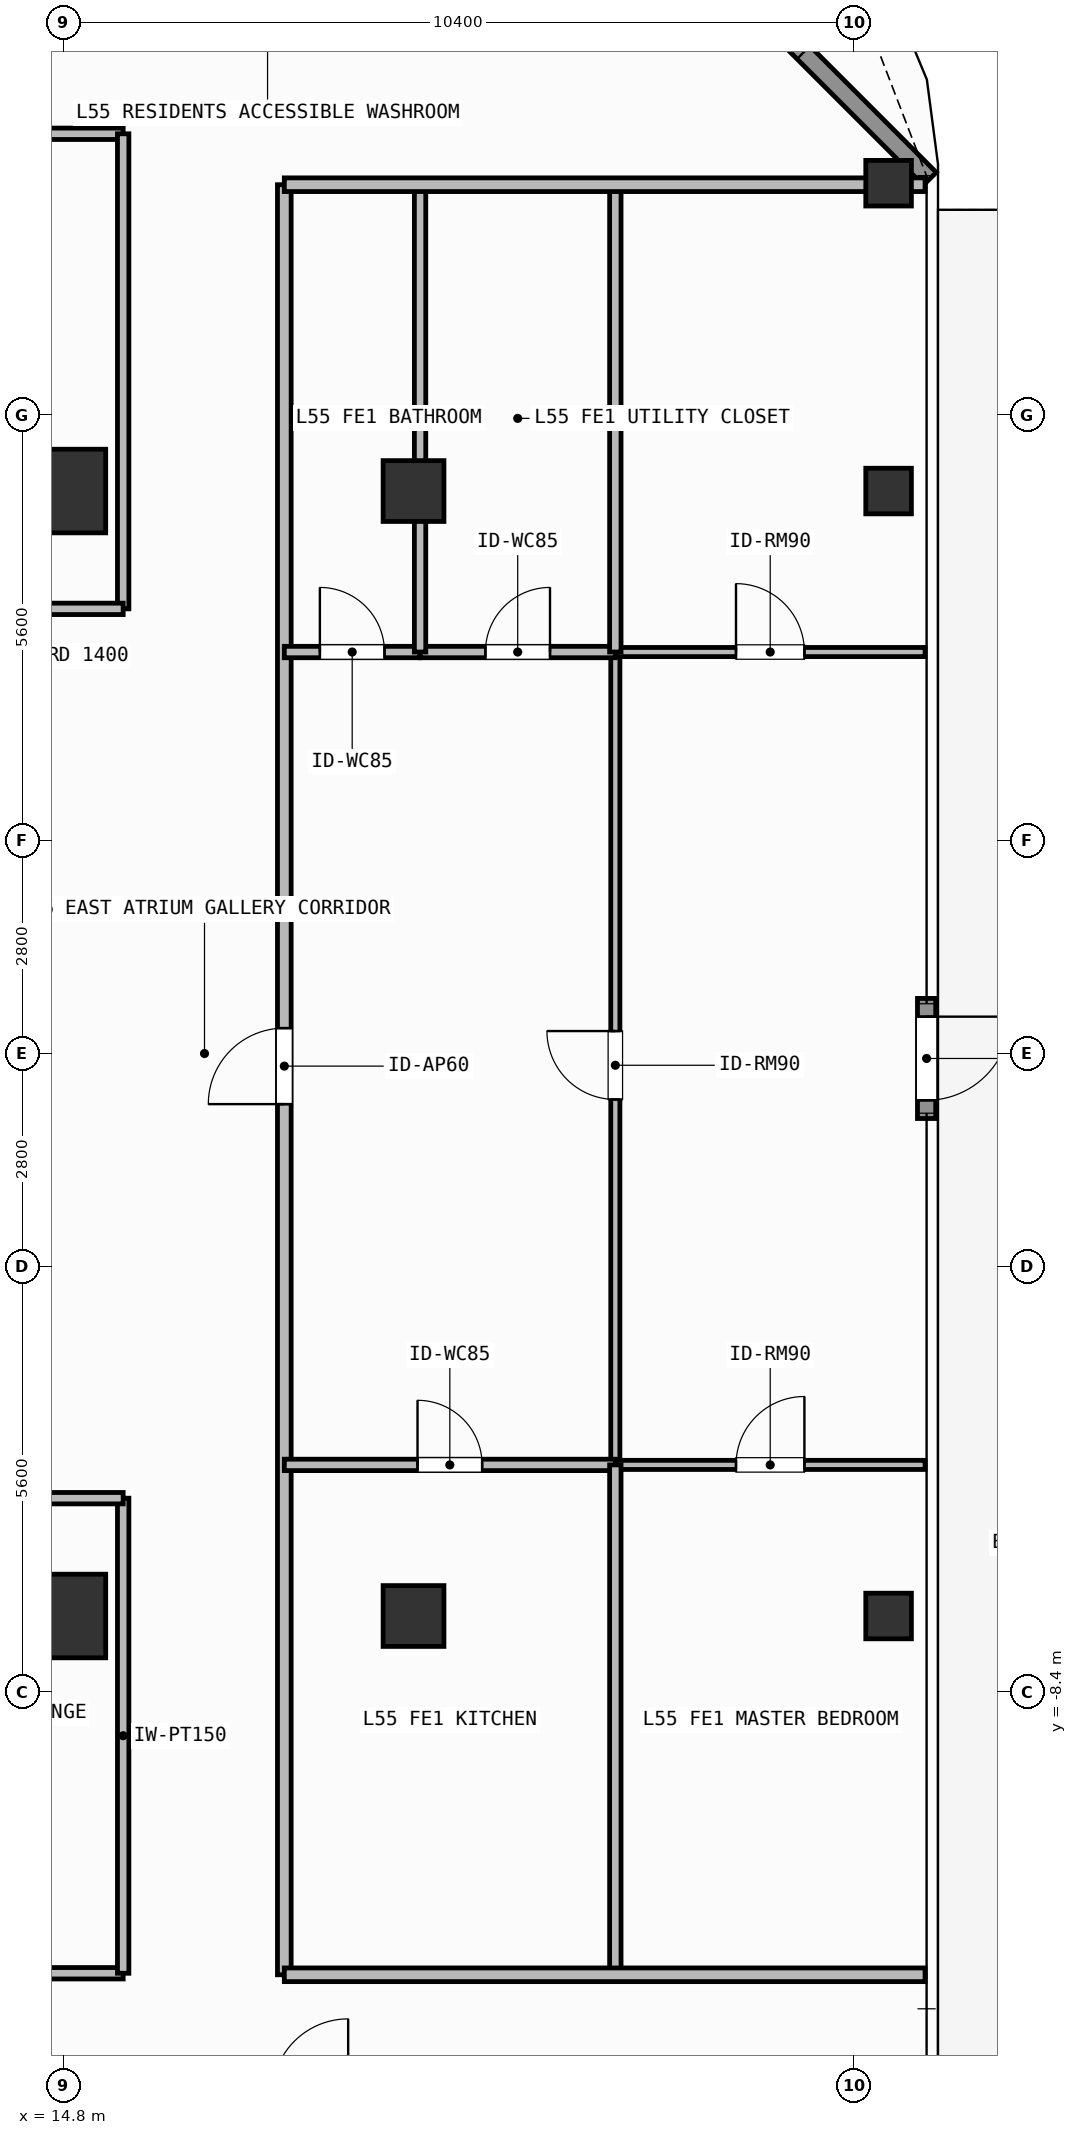
"""IFC4 building model, lengths in metres.
Left out: names, types, materials, properties, quantities, classifications, styles, units other than length and angle.
Written with IfcOpenShell. Run it as: python <this file> out.ifc"""

import sys

from ifc_helpers import new_model, si_unit, direction, frame, frame_2d, origin, origin_2d, place, context, subcontext, project, spatial, rectangle, hollow_rectangle, extrude, element, fill, save


model = new_model("IFC4")
c1 = context("Model", 3, precision=1e-05, world=origin(), true_north=direction((0.0, 1.0)))
c2 = subcontext(c1, "Body", "Model", "MODEL_VIEW")
j1 = project(units=[si_unit("LENGTHUNIT", "METRE"), si_unit("PLANEANGLEUNIT", "RADIAN")], contexts=[c1])
p1 = place(None, origin())
s1 = spatial("IfcSite", under=j1, at=p1, CompositionType="ELEMENT")
p2 = place(p1, origin())
s2 = spatial("IfcBuilding", under=s1, at=p2, CompositionType="ELEMENT")
p3 = place(p2, frame((0.0, 0.0, 223.5)))
s3 = spatial("IfcBuildingStorey", under=s2, at=p3, CompositionType="ELEMENT", Elevation=223.5)
for number, where, z_axis, x_axis in (
    (1, (14.8, -7.4, 0.0), (0.0, 0.0, 1.0), (1.0, 0.0, 0.0)),
    (2, (14.8, 7.4, 0.0), (0.0, 0.0, 1.0), (1.0, 0.0, 0.0)),
):
    element("IfcColumn", number, at=place(p3, frame(where, z_axis=z_axis, x_axis=x_axis)), inside=s3, PredefinedType="COLUMN", context=c2, shape_type="SweptSolid", body=[
        extrude(rectangle(XDim=1.1, YDim=1.1, at=origin_2d()), origin(), (0.0, 0.0, 1.0), 3.9),
    ])
for number, where, z_axis, x_axis in (
    (3, (19.4, -7.4, 0.0), (0.0, 0.0, 1.0), (1.0, 0.0, 0.0)),
    (4, (19.4, 7.4, 0.0), (0.0, 0.0, 1.0), (1.0, 0.0, 0.0)),
):
    element("IfcColumn", number, at=place(p3, frame(where, z_axis=z_axis, x_axis=x_axis)), inside=s3, PredefinedType="COLUMN", context=c2, shape_type="SweptSolid", body=[
        extrude(hollow_rectangle(XDim=0.8, YDim=0.8, WallThickness=0.036, at=origin_2d()), origin(), (0.0, 0.0, 1.0), 3.9),
    ])
for number, where, z_axis, x_axis in (
    (5, (25.65, 11.45, 0.0), (0.0, 0.0, 1.0), (1.0, 0.0, 0.0)),
    (6, (25.65, -7.4, 0.0), (0.0, 0.0, 1.0), (1.0, 0.0, 0.0)),
    (7, (25.65, 7.4, 0.0), (0.0, 0.0, 1.0), (1.0, 0.0, 0.0)),
):
    element("IfcColumn", number, at=place(p3, frame(where, z_axis=z_axis, x_axis=x_axis)), inside=s3, PredefinedType="COLUMN", context=c2, shape_type="SweptSolid", body=[
        extrude(hollow_rectangle(XDim=0.6, YDim=0.6, WallThickness=0.028, at=origin_2d()), origin(), (0.0, 0.0, 1.0), 3.9),
    ])
p4 = place(p3, frame((26.15, 0.725, 0.0), z_axis=(0.0, 0.0, 1.0), x_axis=(0.0, -1.0, 0.0)))
e8 = element("IfcWall", 8, at=p4, inside=s3, PredefinedType="SOLIDWALL", context=c2, shape_type="SweptSolid", body=[
    extrude(rectangle(XDim=1.58, YDim=0.24, at=frame_2d((0.79, 0.0))), origin(), (0.0, 0.0, 1.0), 3.68),
])
p5 = place(p4, frame((0.24, 0.0, 0.0)))
e9 = element("IfcOpeningElement", 9, at=p5, cuts=e8, PredefinedType="OPENING", context=c2, shape_type="SweptSolid", body=[
    extrude(rectangle(XDim=1.1, YDim=2.2, at=frame_2d((0.55, 1.1))), frame((0.0, 0.13, 0.0), z_axis=(0.0, -1.0, 0.0), x_axis=(1.0, 0.0, 0.0)), (0.0, 0.0, 1.0), 0.26),
])
p6 = place(p3, frame((21.808, 15.892, 0.0), z_axis=(0.0, 0.0, 1.0), x_axis=(0.707106781187, -0.707106781187, 0.0)))
e10 = element("IfcWall", 10, at=p6, inside=s3, PredefinedType="SOLIDWALL", context=c2, shape_type="SweptSolid", body=[
    extrude(rectangle(XDim=6.201, YDim=0.24, at=frame_2d((3.101, 0.0))), origin(), (0.0, 0.0, 1.0), 3.68),
])
p7 = place(p6, frame((2.351, 0.0, 0.8)))
e11 = element("IfcOpeningElement", 11, at=p7, cuts=e10, PredefinedType="OPENING", context=c2, shape_type="SweptSolid", body=[
    extrude(rectangle(XDim=1.5, YDim=1.85, at=frame_2d((0.75, 0.925))), frame((0.0, 0.13, 0.0), z_axis=(0.0, -1.0, 0.0), x_axis=(1.0, 0.0, 0.0)), (0.0, 0.0, 1.0), 0.26),
])
p8 = place(p3, frame((10.1, -12.1, 0.0), z_axis=(0.0, 0.0, 1.0), x_axis=(1.0, 0.0, 0.0)))
e12 = element("IfcWall", 12, at=p8, inside=s3, PredefinedType="PARTITIONING", context=c2, shape_type="SweptSolid", body=[
    extrude(rectangle(XDim=5.48, YDim=0.15, at=frame_2d((2.74, 0.0))), origin(), (0.0, 0.0, 1.0), 3.68),
])
p9 = place(p8, frame((2.29, 0.0, 0.0)))
e13 = element("IfcOpeningElement", 13, at=p9, cuts=e12, PredefinedType="OPENING", context=c2, shape_type="SweptSolid", body=[
    extrude(rectangle(XDim=0.9, YDim=2.1, at=frame_2d((0.45, 1.05))), frame((0.0, 0.085, 0.0), z_axis=(0.0, -1.0, 0.0), x_axis=(1.0, 0.0, 0.0)), (0.0, 0.0, 1.0), 0.17),
])
p10 = place(p3, frame((8.36, 12.1, 0.0), z_axis=(0.0, 0.0, 1.0), x_axis=(1.0, 0.0, 0.0)))
e14 = element("IfcWall", 14, at=p10, inside=s3, PredefinedType="PARTITIONING", context=c2, shape_type="SweptSolid", body=[
    extrude(rectangle(XDim=7.22, YDim=0.15, at=frame_2d((3.61, 0.0))), origin(), (0.0, 0.0, 1.0), 3.68),
])
p11 = place(p10, frame((3.513, 0.0, 0.0)))
e15 = element("IfcOpeningElement", 15, at=p11, cuts=e14, PredefinedType="OPENING", context=c2, shape_type="SweptSolid", body=[
    extrude(rectangle(XDim=0.9, YDim=2.1, at=frame_2d((0.45, 1.05))), frame((0.0, 0.085, 0.0), z_axis=(0.0, -1.0, 0.0), x_axis=(1.0, 0.0, 0.0)), (0.0, 0.0, 1.0), 0.17),
])
p12 = place(p3, frame((17.7, -12.12, 0.0), z_axis=(0.0, 0.0, 1.0), x_axis=(0.0, 1.0, 0.0)))
e16 = element("IfcWall", 16, at=p12, inside=s3, PredefinedType="PARTITIONING", context=c2, shape_type="SweptSolid", body=[
    extrude(rectangle(XDim=23.55, YDim=0.18, at=frame_2d((11.775, 0.0))), origin(), (0.0, 0.0, 1.0), 3.68),
])
p13 = place(p12, frame((11.454, 0.0, 0.0)))
e17 = element("IfcOpeningElement", 17, at=p13, cuts=e16, PredefinedType="OPENING", context=c2, shape_type="SweptSolid", body=[
    extrude(rectangle(XDim=1.0, YDim=2.2, at=frame_2d((0.5, 1.1))), frame((0.0, 0.1, 0.0), z_axis=(0.0, -1.0, 0.0), x_axis=(1.0, 0.0, 0.0)), (0.0, 0.0, 1.0), 0.2),
])
p14 = place(p3, frame((22.055, -5.412, 0.0), z_axis=(0.0, 0.0, 1.0), x_axis=(0.0, 1.0, 0.0)))
e18 = element("IfcWall", 18, at=p14, inside=s3, PredefinedType="PARTITIONING", context=c2, shape_type="SweptSolid", body=[
    extrude(rectangle(XDim=10.694, YDim=0.12, at=frame_2d((5.347, 0.0))), origin(), (0.0, 0.0, 1.0), 3.68),
])
p15 = place(p14, frame((4.808, 0.0, 0.0)))
e19 = element("IfcOpeningElement", 19, at=p15, cuts=e18, PredefinedType="OPENING", context=c2, shape_type="SweptSolid", body=[
    extrude(rectangle(XDim=0.9, YDim=2.1, at=frame_2d((0.45, 1.05))), frame((0.0, 0.07, 0.0), z_axis=(0.0, -1.0, 0.0), x_axis=(1.0, 0.0, 0.0)), (0.0, 0.0, 1.0), 0.14),
])
p16 = place(p3, frame((17.7, 5.282, 0.0), z_axis=(0.0, 0.0, 1.0), x_axis=(1.0, 0.0, 0.0)))
e20 = element("IfcWall", 20, at=p16, inside=s3, PredefinedType="PARTITIONING", context=c2, shape_type="SweptSolid", body=[
    extrude(rectangle(XDim=1.786, YDim=0.15, at=frame_2d((0.893, 0.0))), origin(), (0.0, 0.0, 1.0), 3.68),
])
p17 = place(p16, frame((0.468, 0.0, 0.0)))
e21 = element("IfcOpeningElement", 21, at=p17, cuts=e20, PredefinedType="OPENING", context=c2, shape_type="SweptSolid", body=[
    extrude(rectangle(XDim=0.85, YDim=2.1, at=frame_2d((0.425, 1.05))), frame((0.0, 0.085, 0.0), z_axis=(0.0, -1.0, 0.0), x_axis=(1.0, 0.0, 0.0)), (0.0, 0.0, 1.0), 0.17),
])
p18 = place(p3, frame((19.486, 5.282, 0.0), z_axis=(0.0, 0.0, 1.0), x_axis=(1.0, 0.0, 0.0)))
e22 = element("IfcWall", 22, at=p18, inside=s3, PredefinedType="PARTITIONING", context=c2, shape_type="SweptSolid", body=[
    extrude(rectangle(XDim=2.569, YDim=0.15, at=frame_2d((1.284, 0.0))), origin(), (0.0, 0.0, 1.0), 3.68),
])
p19 = place(p18, frame((0.86, 0.0, 0.0)))
e23 = element("IfcOpeningElement", 23, at=p19, cuts=e22, PredefinedType="OPENING", context=c2, shape_type="SweptSolid", body=[
    extrude(rectangle(XDim=0.85, YDim=2.1, at=frame_2d((0.425, 1.05))), frame((0.0, 0.085, 0.0), z_axis=(0.0, -1.0, 0.0), x_axis=(1.0, 0.0, 0.0)), (0.0, 0.0, 1.0), 0.17),
])
p20 = place(p3, frame((17.7, -5.412, 0.0), z_axis=(0.0, 0.0, 1.0), x_axis=(1.0, 0.0, 0.0)))
e24 = element("IfcWall", 24, at=p20, inside=s3, PredefinedType="PARTITIONING", context=c2, shape_type="SweptSolid", body=[
    extrude(rectangle(XDim=4.355, YDim=0.15, at=frame_2d((2.177, 0.0))), origin(), (0.0, 0.0, 1.0), 3.68),
])
p21 = place(p20, frame((1.752, 0.0, 0.0)))
e25 = element("IfcOpeningElement", 25, at=p21, cuts=e24, PredefinedType="OPENING", context=c2, shape_type="SweptSolid", body=[
    extrude(rectangle(XDim=0.85, YDim=2.1, at=frame_2d((0.425, 1.05))), frame((0.0, 0.085, 0.0), z_axis=(0.0, -1.0, 0.0), x_axis=(1.0, 0.0, 0.0)), (0.0, 0.0, 1.0), 0.17),
])
p22 = place(p3, frame((22.055, -5.412, 0.0), z_axis=(0.0, 0.0, 1.0), x_axis=(1.0, 0.0, 0.0)))
e26 = element("IfcWall", 26, at=p22, inside=s3, PredefinedType="PARTITIONING", context=c2, shape_type="SweptSolid", body=[
    extrude(rectangle(XDim=4.075, YDim=0.12, at=frame_2d((2.038, 0.0))), origin(), (0.0, 0.0, 1.0), 3.68),
])
p23 = place(p22, frame((1.587, 0.0, 0.0)))
e27 = element("IfcOpeningElement", 27, at=p23, cuts=e26, PredefinedType="OPENING", context=c2, shape_type="SweptSolid", body=[
    extrude(rectangle(XDim=0.9, YDim=2.1, at=frame_2d((0.45, 1.05))), frame((0.0, 0.07, 0.0), z_axis=(0.0, -1.0, 0.0), x_axis=(1.0, 0.0, 0.0)), (0.0, 0.0, 1.0), 0.14),
])
p24 = place(p3, frame((22.055, 5.282, 0.0), z_axis=(0.0, 0.0, 1.0), x_axis=(1.0, 0.0, 0.0)))
e28 = element("IfcWall", 28, at=p24, inside=s3, PredefinedType="PARTITIONING", context=c2, shape_type="SweptSolid", body=[
    extrude(rectangle(XDim=4.075, YDim=0.12, at=frame_2d((2.038, 0.0))), origin(), (0.0, 0.0, 1.0), 3.68),
])
p25 = place(p24, frame((1.587, 0.0, 0.0)))
e29 = element("IfcOpeningElement", 29, at=p25, cuts=e28, PredefinedType="OPENING", context=c2, shape_type="SweptSolid", body=[
    extrude(rectangle(XDim=0.9, YDim=2.1, at=frame_2d((0.45, 1.05))), frame((0.0, 0.07, 0.0), z_axis=(0.0, -1.0, 0.0), x_axis=(1.0, 0.0, 0.0)), (0.0, 0.0, 1.0), 0.14),
])
p26 = place(p3, frame((15.58, -12.1, 0.0), z_axis=(0.0, 0.0, 1.0), x_axis=(0.0, 1.0, 0.0)))
e30 = element("IfcWall", 30, at=p26, inside=s3, PredefinedType="PARTITIONING", context=c2, shape_type="SweptSolid", body=[
    extrude(rectangle(XDim=6.25, YDim=0.15, at=frame_2d((3.125, 0.0))), origin(), (0.0, 0.0, 1.0), 3.68),
])
p27 = place(p3, frame((8.96, -5.85, 0.0), z_axis=(0.0, 0.0, 1.0), x_axis=(1.0, 0.0, 0.0)))
e31 = element("IfcWall", 31, at=p27, inside=s3, PredefinedType="PARTITIONING", context=c2, shape_type="SweptSolid", body=[
    extrude(rectangle(XDim=6.62, YDim=0.15, at=frame_2d((3.31, 0.0))), origin(), (0.0, 0.0, 1.0), 3.68),
])
p28 = place(p3, frame((15.58, 5.85, 0.0), z_axis=(0.0, 0.0, 1.0), x_axis=(0.0, 1.0, 0.0)))
e32 = element("IfcWall", 32, at=p28, inside=s3, PredefinedType="PARTITIONING", context=c2, shape_type="SweptSolid", body=[
    extrude(rectangle(XDim=6.25, YDim=0.15, at=frame_2d((3.125, 0.0))), origin(), (0.0, 0.0, 1.0), 3.68),
])
p29 = place(p3, frame((8.96, 5.85, 0.0), z_axis=(0.0, 0.0, 1.0), x_axis=(1.0, 0.0, 0.0)))
e33 = element("IfcWall", 33, at=p29, inside=s3, PredefinedType="PARTITIONING", context=c2, shape_type="SweptSolid", body=[
    extrude(rectangle(XDim=6.62, YDim=0.15, at=frame_2d((3.31, 0.0))), origin(), (0.0, 0.0, 1.0), 3.68),
])
p30 = place(p3, frame((19.486, 5.282, 0.0), z_axis=(0.0, 0.0, 1.0), x_axis=(0.0, 1.0, 0.0)))
e34 = element("IfcWall", 34, at=p30, inside=s3, PredefinedType="PARTITIONING", context=c2, shape_type="SweptSolid", body=[
    extrude(rectangle(XDim=6.148, YDim=0.15, at=frame_2d((3.074, 0.0))), origin(), (0.0, 0.0, 1.0), 3.182),
])
p31 = place(p3, frame((22.055, -12.12, 0.0), z_axis=(0.0, 0.0, 1.0), x_axis=(0.0, 1.0, 0.0)))
e35 = element("IfcWall", 35, at=p31, inside=s3, PredefinedType="PARTITIONING", context=c2, shape_type="SweptSolid", body=[
    extrude(rectangle(XDim=6.708, YDim=0.15, at=frame_2d((3.354, 0.0))), origin(), (0.0, 0.0, 1.0), 3.68),
])
p32 = place(p3, frame((22.055, 5.282, 0.0), z_axis=(0.0, 0.0, 1.0), x_axis=(0.0, 1.0, 0.0)))
e36 = element("IfcWall", 36, at=p32, inside=s3, PredefinedType="PARTITIONING", context=c2, shape_type="SweptSolid", body=[
    extrude(rectangle(XDim=6.148, YDim=0.15, at=frame_2d((3.074, 0.0))), origin(), (0.0, 0.0, 1.0), 3.68),
])
p33 = place(p3, frame((17.7, -12.12, 0.0), z_axis=(0.0, 0.0, 1.0), x_axis=(1.0, 0.0, 0.0)))
e37 = element("IfcWall", 37, at=p33, inside=s3, PredefinedType="PARTITIONING", context=c2, shape_type="SweptSolid", body=[
    extrude(rectangle(XDim=8.43, YDim=0.18, at=frame_2d((4.215, 0.0))), origin(), (0.0, 0.0, 1.0), 3.68),
])
p34 = place(p3, frame((17.7, 11.43, 0.0), z_axis=(0.0, 0.0, 1.0), x_axis=(1.0, 0.0, 0.0)))
e38 = element("IfcWall", 38, at=p34, inside=s3, PredefinedType="PARTITIONING", context=c2, shape_type="SweptSolid", body=[
    extrude(rectangle(XDim=8.43, YDim=0.18, at=frame_2d((4.215, 0.0))), origin(), (0.0, 0.0, 1.0), 3.42),
])
p35 = place(p5, origin())
e39 = element("IfcDoor", 39, at=p35, inside=s3, OperationType="SINGLE_SWING_LEFT", PredefinedType="DOOR", context=c2, shape_type="SweptSolid", body=[
    extrude(rectangle(XDim=1.1, YDim=2.2, at=frame_2d((0.55, 1.1))), frame((0.0, 0.025, 0.0), z_axis=(0.0, -1.0, 0.0), x_axis=(1.0, 0.0, 0.0)), (0.0, 0.0, 1.0), 0.05),
])
fill(e9, e39)
p36 = place(p7, origin())
e40 = element("IfcWindow", 40, at=p36, inside=s3, PartitioningType="SINGLE_PANEL", PredefinedType="WINDOW", context=c2, shape_type="SweptSolid", body=[
    extrude(rectangle(XDim=1.5, YDim=1.85, at=frame_2d((0.75, 0.925))), frame((0.0, 0.03, 0.0), z_axis=(0.0, -1.0, 0.0), x_axis=(1.0, 0.0, 0.0)), (0.0, 0.0, 1.0), 0.06),
])
fill(e11, e40)
p37 = place(p13, origin())
e41 = element("IfcDoor", 41, at=p37, inside=s3, OperationType="SINGLE_SWING_LEFT", PredefinedType="DOOR", context=c2, shape_type="SweptSolid", body=[
    extrude(rectangle(XDim=1.0, YDim=2.2, at=frame_2d((0.5, 1.1))), frame((0.0, 0.025, 0.0), z_axis=(0.0, -1.0, 0.0), x_axis=(1.0, 0.0, 0.0)), (0.0, 0.0, 1.0), 0.05),
])
fill(e17, e41)
p38 = place(p15, origin())
e42 = element("IfcDoor", 42, at=p38, inside=s3, OperationType="SINGLE_SWING_RIGHT", PredefinedType="DOOR", context=c2, shape_type="SweptSolid", body=[
    extrude(rectangle(XDim=0.9, YDim=2.1, at=frame_2d((0.45, 1.05))), frame((0.0, 0.025, 0.0), z_axis=(0.0, -1.0, 0.0), x_axis=(1.0, 0.0, 0.0)), (0.0, 0.0, 1.0), 0.05),
])
fill(e19, e42)
p39 = place(p17, origin())
e43 = element("IfcDoor", 43, at=p39, inside=s3, OperationType="SINGLE_SWING_LEFT", PredefinedType="DOOR", context=c2, shape_type="SweptSolid", body=[
    extrude(rectangle(XDim=0.85, YDim=2.1, at=frame_2d((0.425, 1.05))), frame((0.0, 0.025, 0.0), z_axis=(0.0, -1.0, 0.0), x_axis=(1.0, 0.0, 0.0)), (0.0, 0.0, 1.0), 0.05),
])
fill(e21, e43)
p40 = place(p19, origin())
e44 = element("IfcDoor", 44, at=p40, inside=s3, OperationType="SINGLE_SWING_RIGHT", PredefinedType="DOOR", context=c2, shape_type="SweptSolid", body=[
    extrude(rectangle(XDim=0.85, YDim=2.1, at=frame_2d((0.425, 1.05))), frame((0.0, 0.025, 0.0), z_axis=(0.0, -1.0, 0.0), x_axis=(1.0, 0.0, 0.0)), (0.0, 0.0, 1.0), 0.05),
])
fill(e23, e44)
p41 = place(p21, origin())
e45 = element("IfcDoor", 45, at=p41, inside=s3, OperationType="SINGLE_SWING_LEFT", PredefinedType="DOOR", context=c2, shape_type="SweptSolid", body=[
    extrude(rectangle(XDim=0.85, YDim=2.1, at=frame_2d((0.425, 1.05))), frame((0.0, 0.025, 0.0), z_axis=(0.0, -1.0, 0.0), x_axis=(1.0, 0.0, 0.0)), (0.0, 0.0, 1.0), 0.05),
])
fill(e25, e45)
p42 = place(p23, origin())
e46 = element("IfcDoor", 46, at=p42, inside=s3, OperationType="SINGLE_SWING_RIGHT", PredefinedType="DOOR", context=c2, shape_type="SweptSolid", body=[
    extrude(rectangle(XDim=0.9, YDim=2.1, at=frame_2d((0.45, 1.05))), frame((0.0, 0.025, 0.0), z_axis=(0.0, -1.0, 0.0), x_axis=(1.0, 0.0, 0.0)), (0.0, 0.0, 1.0), 0.05),
])
fill(e27, e46)
p43 = place(p25, origin())
e47 = element("IfcDoor", 47, at=p43, inside=s3, OperationType="SINGLE_SWING_LEFT", PredefinedType="DOOR", context=c2, shape_type="SweptSolid", body=[
    extrude(rectangle(XDim=0.9, YDim=2.1, at=frame_2d((0.45, 1.05))), frame((0.0, 0.025, 0.0), z_axis=(0.0, -1.0, 0.0), x_axis=(1.0, 0.0, 0.0)), (0.0, 0.0, 1.0), 0.05),
])
fill(e29, e47)
save(model, sys.argv[1])
